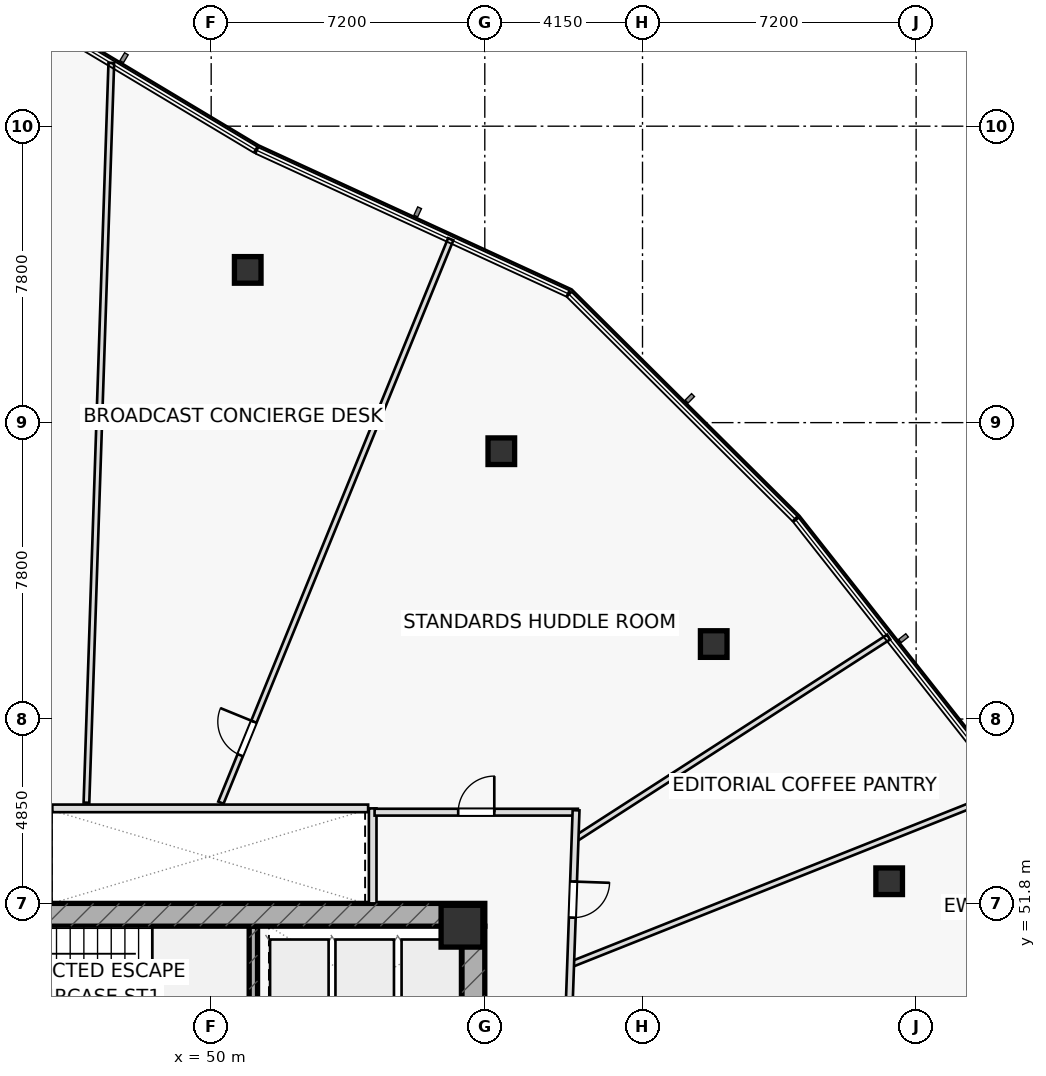
"""IFC4 building model, lengths in metres.
Left out: names, types, materials, properties, quantities, classifications, styles, units other than length and angle.
Written with IfcOpenShell. Run it as: python <this file> out.ifc"""

import sys

from ifc_helpers import new_model, si_unit, direction, frame, frame_2d, origin, origin_2d, place, context, subcontext, project, spatial, rectangle, hollow_rectangle, extrude, element, fill, save


model = new_model("IFC4")
c1 = context("Model", 3, precision=1e-05, world=origin(), true_north=direction((0.0, 1.0)))
c2 = subcontext(c1, "Body", "Model", "MODEL_VIEW")
j1 = project(units=[si_unit("LENGTHUNIT", "METRE"), si_unit("PLANEANGLEUNIT", "RADIAN")], contexts=[c1])
p1 = place(None, origin())
s1 = spatial("IfcSite", under=j1, at=p1, CompositionType="ELEMENT")
p2 = place(p1, origin())
s2 = spatial("IfcBuilding", under=s1, at=p2, CompositionType="ELEMENT")
p3 = place(p2, frame((0.0, 0.0, 74.4)))
s3 = spatial("IfcBuildingStorey", under=s2, at=p3, CompositionType="ELEMENT", Elevation=74.4)
p4 = place(p3, frame((51.11, 48.1, 0.0), z_axis=(0.0, 0.0, 1.0), x_axis=(0.0, 1.0, 0.0)))
e1 = element("IfcWall", 1, at=p4, inside=s3, PredefinedType="SHEAR", context=c2, shape_type="SweptSolid", body=[
    extrude(rectangle(XDim=3.1, YDim=0.22, at=frame_2d((1.55, 0.0))), origin(), (0.0, 0.0, 1.0), 3.6),
])
p5 = place(p3, frame((42.8, 51.5, 0.0), z_axis=(0.0, 0.0, 1.0), x_axis=(1.0, 0.0, 0.0)))
e2 = element("IfcWall", 2, at=p5, inside=s3, PredefinedType="SHEAR", context=c2, shape_type="SweptSolid", body=[
    extrude(rectangle(XDim=14.4, YDim=0.6, at=frame_2d((7.2, 0.0))), origin(), (0.0, 0.0, 1.0), 3.6),
])
p6 = place(p5, frame((0.88, 0.0, 0.0)))
e3 = element("IfcOpeningElement", 3, at=p6, cuts=e2, PredefinedType="OPENING", context=c2, shape_type="SweptSolid", body=[
    extrude(rectangle(XDim=1.05, YDim=2.2, at=frame_2d((0.525, 1.1))), frame((0.0, 0.31, 0.0), z_axis=(0.0, -1.0, 0.0), x_axis=(1.0, 0.0, 0.0)), (0.0, 0.0, 1.0), 0.62),
])
p7 = place(p3, frame((56.9, 38.8, 0.0), z_axis=(0.0, 0.0, 1.0), x_axis=(0.0, 1.0, 0.0)))
e4 = element("IfcWall", 4, at=p7, inside=s3, PredefinedType="SHEAR", context=c2, shape_type="SweptSolid", body=[
    extrude(rectangle(XDim=12.4, YDim=0.6, at=frame_2d((6.2, 0.0))), origin(), (0.0, 0.0, 1.0), 3.6),
])
p8 = place(p7, frame((3.85, 0.0, 0.0)))
e5 = element("IfcOpeningElement", 5, at=p8, cuts=e4, PredefinedType="OPENING", context=c2, shape_type="SweptSolid", body=[
    extrude(rectangle(XDim=1.5, YDim=2.2, at=frame_2d((0.75, 1.1))), frame((0.0, 0.31, 0.0), z_axis=(0.0, -1.0, 0.0), x_axis=(1.0, 0.0, 0.0)), (0.0, 0.0, 1.0), 0.62),
])
p9 = place(p3, frame((56.6, 51.2, 0.0), z_axis=(0.0, 0.0, 1.0), x_axis=(1.0, 0.0, 0.0)))
e6 = element("IfcColumn", 6, at=p9, inside=s3, PredefinedType="COLUMN", context=c2, shape_type="SweptSolid", body=[
    extrude(rectangle(XDim=1.1, YDim=1.1, at=origin_2d()), origin(), (0.0, 0.0, 1.0), 3.6),
])
for number, where, z_axis, x_axis in (
    (7, (67.841, 52.383, 0.0), (0.0, 0.0, 1.0), (1.0, 0.0, 0.0)),
    (8, (63.224, 58.624, 0.0), (0.0, 0.0, 1.0), (1.0, 0.0, 0.0)),
    (9, (57.635, 63.698, 0.0), (0.0, 0.0, 1.0), (1.0, 0.0, 0.0)),
    (10, (50.962, 68.469, 0.0), (0.0, 0.0, 1.0), (1.0, 0.0, 0.0)),
):
    element("IfcColumn", number, at=place(p3, frame(where, z_axis=z_axis, x_axis=x_axis)), inside=s3, PredefinedType="COLUMN", context=c2, shape_type="SweptSolid", body=[
        extrude(hollow_rectangle(XDim=0.7, YDim=0.7, WallThickness=0.04, at=origin_2d()), origin(), (0.0, 0.0, 1.0), 3.6),
    ])
p10 = place(p3, frame((54.25, 51.8, 0.0), z_axis=(0.0, 0.0, 1.0), x_axis=(0.0, 1.0, 0.0)))
e11 = element("IfcWall", 11, at=p10, inside=s3, PredefinedType="PARTITIONING", context=c2, shape_type="SweptSolid", body=[
    extrude(rectangle(XDim=2.5, YDim=0.2, at=frame_2d((1.25, 0.0))), origin(), (0.0, 0.0, 1.0), 3.6),
])
p11 = place(p3, frame((59.458, 50.191, 0.0), z_axis=(0.0, 0.0, 1.0), x_axis=(0.929265937883, 0.369411446344, 0.0)))
e12 = element("IfcWall", 12, at=p11, inside=s3, PredefinedType="PARTITIONING", context=c2, shape_type="SweptSolid", body=[
    extrude(rectangle(XDim=12.191, YDim=0.15, at=frame_2d((6.096, 0.0))), origin(), (0.0, 0.0, 1.0), 2.975),
])
p12 = place(p3, frame((59.575, 53.49, 0.0), z_axis=(0.0, 0.0, 1.0), x_axis=(0.840570280129, 0.541702505222, 0.0)))
e13 = element("IfcWall", 13, at=p12, inside=s3, PredefinedType="PARTITIONING", context=c2, shape_type="SweptSolid", body=[
    extrude(rectangle(XDim=9.816, YDim=0.15, at=frame_2d((4.908, 0.0))), origin(), (0.0, 0.0, 1.0), 3.025),
])
p13 = place(p3, frame((50.255, 54.45, 0.0), z_axis=(0.0, 0.0, 1.0), x_axis=(0.377733219237, 0.925914475038, 0.0)))
e14 = element("IfcWall", 14, at=p13, inside=s3, PredefinedType="PARTITIONING", context=c2, shape_type="SweptSolid", body=[
    extrude(rectangle(XDim=16.012, YDim=0.15, at=frame_2d((8.006, 0.0))), origin(), (0.0, 0.0, 1.0), 2.975),
])
p14 = place(p13, frame((1.35, 0.0, 0.0)))
e15 = element("IfcOpeningElement", 15, at=p14, cuts=e14, PredefinedType="OPENING", context=c2, shape_type="SweptSolid", body=[
    extrude(rectangle(XDim=0.95, YDim=2.05, at=frame_2d((0.475, 1.025))), frame((0.0, 0.085, 0.0), z_axis=(0.0, -1.0, 0.0), x_axis=(1.0, 0.0, 0.0)), (0.0, 0.0, 1.0), 0.17),
])
p15 = place(p3, frame((46.718, 54.45, 0.0), z_axis=(0.0, 0.0, 1.0), x_axis=(0.033606572216, 0.999435139618, 0.0)))
e16 = element("IfcWall", 16, at=p15, inside=s3, PredefinedType="PARTITIONING", context=c2, shape_type="SweptSolid", body=[
    extrude(rectangle(XDim=19.477, YDim=0.15, at=frame_2d((9.738, 0.0))), origin(), (0.0, 0.0, 1.0), 3.025),
])
p16 = place(p3, frame((54.3, 54.2, 0.0), z_axis=(0.0, 0.0, 1.0), x_axis=(1.0, 0.0, 0.0)))
e17 = element("IfcWall", 17, at=p16, inside=s3, PredefinedType="PARTITIONING", context=c2, shape_type="SweptSolid", body=[
    extrude(rectangle(XDim=5.35, YDim=0.18, at=frame_2d((2.675, 0.0))), origin(), (0.0, 0.0, 1.0), 2.975),
])
p17 = place(p16, frame((2.2, 0.0, 0.0)))
e18 = element("IfcOpeningElement", 18, at=p17, cuts=e17, PredefinedType="OPENING", context=c2, shape_type="SweptSolid", body=[
    extrude(rectangle(XDim=0.95, YDim=2.05, at=frame_2d((0.475, 1.025))), frame((0.0, 0.1, 0.0), z_axis=(0.0, -1.0, 0.0), x_axis=(1.0, 0.0, 0.0)), (0.0, 0.0, 1.0), 0.2),
])
p18 = place(p3, frame((59.602, 54.25, 0.0), z_axis=(0.0, 0.0, 1.0), x_axis=(-0.035265891834, -0.999377964973, 0.0)))
e19 = element("IfcWall", 19, at=p18, inside=s3, PredefinedType="PARTITIONING", context=c2, shape_type="SweptSolid", body=[
    extrude(rectangle(XDim=5.954, YDim=0.18, at=frame_2d((2.977, 0.0))), origin(), (0.0, 0.0, 1.0), 2.975),
])
p19 = place(p18, frame((1.876, 0.0, 0.0)))
e20 = element("IfcOpeningElement", 20, at=p19, cuts=e19, PredefinedType="OPENING", context=c2, shape_type="SweptSolid", body=[
    extrude(rectangle(XDim=0.95, YDim=2.05, at=frame_2d((0.475, 1.025))), frame((0.0, 0.1, 0.0), z_axis=(0.0, -1.0, 0.0), x_axis=(1.0, 0.0, 0.0)), (0.0, 0.0, 1.0), 0.2),
])
p20 = place(p3, frame((45.82, 54.3, 0.0), z_axis=(0.0, 0.0, 1.0), x_axis=(1.0, 0.0, 0.0)))
e21 = element("IfcWall", 21, at=p20, inside=s3, PredefinedType="PARTITIONING", context=c2, shape_type="SweptSolid", body=[
    extrude(rectangle(XDim=8.31, YDim=0.2, at=frame_2d((4.155, 0.0))), origin(), (0.0, 0.0, 1.0), 3.6),
])
p21 = place(p14, origin())
e22 = element("IfcDoor", 22, at=p21, inside=s3, OperationType="SINGLE_SWING_RIGHT", PredefinedType="DOOR", context=c2, shape_type="SweptSolid", body=[
    extrude(rectangle(XDim=0.95, YDim=2.05, at=frame_2d((0.475, 1.025))), frame((0.0, 0.025, 0.0), z_axis=(0.0, -1.0, 0.0), x_axis=(1.0, 0.0, 0.0)), (0.0, 0.0, 1.0), 0.05),
])
fill(e15, e22)
p22 = place(p17, origin())
e23 = element("IfcDoor", 23, at=p22, inside=s3, OperationType="SINGLE_SWING_RIGHT", PredefinedType="DOOR", context=c2, shape_type="SweptSolid", body=[
    extrude(rectangle(XDim=0.95, YDim=2.05, at=frame_2d((0.475, 1.025))), frame((0.0, 0.025, 0.0), z_axis=(0.0, -1.0, 0.0), x_axis=(1.0, 0.0, 0.0)), (0.0, 0.0, 1.0), 0.05),
])
fill(e18, e23)
p23 = place(p19, origin())
e24 = element("IfcDoor", 24, at=p23, inside=s3, OperationType="SINGLE_SWING_LEFT", PredefinedType="DOOR", context=c2, shape_type="SweptSolid", body=[
    extrude(rectangle(XDim=0.95, YDim=2.05, at=frame_2d((0.475, 1.025))), frame((0.0, 0.025, 0.0), z_axis=(0.0, -1.0, 0.0), x_axis=(1.0, 0.0, 0.0)), (0.0, 0.0, 1.0), 0.05),
])
fill(e20, e24)
save(model, sys.argv[1])
